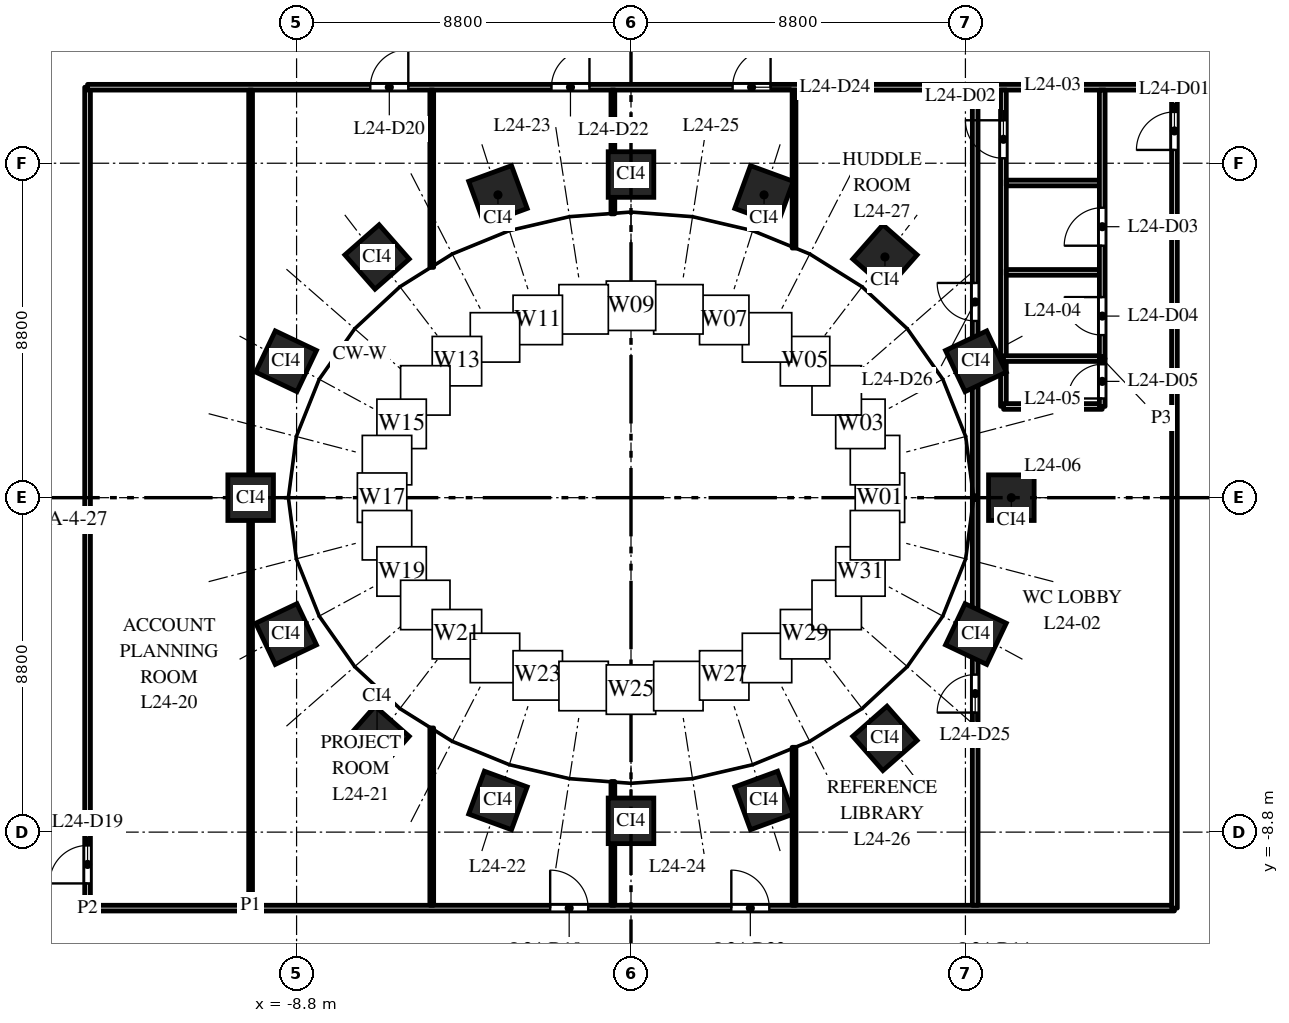
"""IFC4 building model, lengths in metres.
Left out: names, types, materials, properties, quantities, classifications, styles, units other than length and angle.
Written with IfcOpenShell. Run it as: python <this file> out.ifc"""

import sys

from ifc_helpers import new_model, si_unit, direction, frame, frame_2d, origin, origin_2d, place, context, subcontext, project, spatial, rectangle, extrude, element, fill, save


model = new_model("IFC4")
c1 = context("Model", 3, precision=1e-05, world=origin(), true_north=direction((0.0, 1.0)))
c2 = subcontext(c1, "Body", "Model", "MODEL_VIEW")
j1 = project(units=[si_unit("LENGTHUNIT", "METRE"), si_unit("PLANEANGLEUNIT", "RADIAN")], contexts=[c1])
p1 = place(None, origin())
s1 = spatial("IfcSite", under=j1, at=p1, CompositionType="ELEMENT")
p2 = place(p1, origin())
s2 = spatial("IfcBuilding", under=s1, at=p2, CompositionType="ELEMENT")
p3 = place(p2, frame((0.0, 0.0, 108.0)))
s3 = spatial("IfcBuildingStorey", under=s2, at=p3, CompositionType="ELEMENT", Elevation=108.0)
for number, where, z_axis, x_axis in (
    (1, (10.008, 0.0, 0.0), (0.0, 0.0, 1.0), (0.0, 1.0, 0.0)),
    (2, (9.076, 3.588, 0.0), (0.0, 0.0, 1.0), (-0.429, 0.903, 0.0)),
    (3, (6.682, 6.334, 0.0), (0.0, 0.0, 1.0), (-0.751, 0.66, 0.0)),
    (4, (3.501, 7.967, 0.0), (0.0, 0.0, 1.0), (-0.939, 0.344, 0.0)),
    (5, (0.0, 8.503, 0.0), (0.0, 0.0, 1.0), (-1.0, 0.0, 0.0)),
    (6, (-3.501, 7.967, 0.0), (0.0, 0.0, 1.0), (-0.939, -0.344, 0.0)),
    (7, (-6.682, 6.334, 0.0), (0.0, 0.0, 1.0), (-0.751, -0.66, 0.0)),
    (8, (-9.076, 3.588, 0.0), (0.0, 0.0, 1.0), (-0.429, -0.903, 0.0)),
    (9, (-10.008, 0.0, 0.0), (0.0, 0.0, 1.0), (0.0, -1.0, 0.0)),
    (10, (-9.076, -3.588, 0.0), (0.0, 0.0, 1.0), (0.429, -0.903, 0.0)),
    (11, (-6.682, -6.334, 0.0), (0.0, 0.0, 1.0), (0.751, -0.66, 0.0)),
    (12, (-3.501, -7.967, 0.0), (0.0, 0.0, 1.0), (0.939, -0.344, 0.0)),
    (13, (0.0, -8.503, 0.0), (0.0, 0.0, 1.0), (1.0, 0.0, 0.0)),
    (14, (3.501, -7.967, 0.0), (0.0, 0.0, 1.0), (0.939, 0.344, 0.0)),
    (15, (6.682, -6.334, 0.0), (0.0, 0.0, 1.0), (0.751, 0.66, 0.0)),
    (16, (9.076, -3.588, 0.0), (0.0, 0.0, 1.0), (0.429, 0.903, 0.0)),
):
    element("IfcColumn", number, at=place(p3, frame(where, z_axis=z_axis, x_axis=x_axis)), inside=s3, PredefinedType="COLUMN", context=c2, shape_type="SweptSolid", body=[
        extrude(rectangle(XDim=1.2, YDim=1.2, at=origin_2d()), origin(), (0.0, 0.0, 1.0), 4.0),
    ])
p4 = place(p3, frame((-14.3, -10.8, 0.0), z_axis=(0.0, 0.0, 1.0), x_axis=(0.0, 1.0, 0.0)))
e17 = element("IfcWall", 17, at=p4, inside=s3, PredefinedType="PARTITIONING", context=c2, shape_type="SweptSolid", body=[
    extrude(rectangle(XDim=21.6, YDim=0.15, at=frame_2d((10.8, 0.0))), origin(), (0.0, 0.0, 1.0), 2.75),
])
p5 = place(p4, frame((0.65, 0.0, 0.0)))
e18 = element("IfcOpeningElement", 18, at=p5, cuts=e17, PredefinedType="OPENING", context=c2, shape_type="SweptSolid", body=[
    extrude(rectangle(XDim=1.0, YDim=2.1, at=frame_2d((0.5, 1.05))), frame((0.0, 0.085, 0.0), z_axis=(0.0, -1.0, 0.0), x_axis=(1.0, 0.0, 0.0)), (0.0, 0.0, 1.0), 0.17),
])
p6 = place(p3, frame((-14.3, -10.8, 0.0), z_axis=(0.0, 0.0, 1.0), x_axis=(1.0, 0.0, 0.0)))
e19 = element("IfcWall", 19, at=p6, inside=s3, PredefinedType="PARTITIONING", context=c2, shape_type="SweptSolid", body=[
    extrude(rectangle(XDim=28.6, YDim=0.15, at=frame_2d((14.3, 0.0))), origin(), (0.0, 0.0, 1.0), 2.85),
])
p7 = place(p6, frame((12.173, 0.0, 0.0)))
e20 = element("IfcOpeningElement", 20, at=p7, cuts=e19, PredefinedType="OPENING", context=c2, shape_type="SweptSolid", body=[
    extrude(rectangle(XDim=1.0, YDim=2.1, at=frame_2d((0.5, 1.05))), frame((0.0, 0.085, 0.0), z_axis=(0.0, -1.0, 0.0), x_axis=(1.0, 0.0, 0.0)), (0.0, 0.0, 1.0), 0.17),
])
p8 = place(p6, frame((16.94, 0.0, 0.0)))
e21 = element("IfcOpeningElement", 21, at=p8, cuts=e19, PredefinedType="OPENING", context=c2, shape_type="SweptSolid", body=[
    extrude(rectangle(XDim=1.0, YDim=2.1, at=frame_2d((0.5, 1.05))), frame((0.0, 0.085, 0.0), z_axis=(0.0, -1.0, 0.0), x_axis=(1.0, 0.0, 0.0)), (0.0, 0.0, 1.0), 0.17),
])
p9 = place(p3, frame((-14.3, 10.8, 0.0), z_axis=(0.0, 0.0, 1.0), x_axis=(1.0, 0.0, 0.0)))
e22 = element("IfcWall", 22, at=p9, inside=s3, PredefinedType="PARTITIONING", context=c2, shape_type="SweptSolid", body=[
    extrude(rectangle(XDim=28.6, YDim=0.15, at=frame_2d((14.3, 0.0))), origin(), (0.0, 0.0, 1.0), 2.85),
])
p10 = place(p9, frame((7.44, 0.0, 0.0)))
e23 = element("IfcOpeningElement", 23, at=p10, cuts=e22, PredefinedType="OPENING", context=c2, shape_type="SweptSolid", body=[
    extrude(rectangle(XDim=1.0, YDim=2.1, at=frame_2d((0.5, 1.05))), frame((0.0, 0.085, 0.0), z_axis=(0.0, -1.0, 0.0), x_axis=(1.0, 0.0, 0.0)), (0.0, 0.0, 1.0), 0.17),
])
p11 = place(p9, frame((12.207, 0.0, 0.0)))
e24 = element("IfcOpeningElement", 24, at=p11, cuts=e22, PredefinedType="OPENING", context=c2, shape_type="SweptSolid", body=[
    extrude(rectangle(XDim=1.0, YDim=2.1, at=frame_2d((0.5, 1.05))), frame((0.0, 0.085, 0.0), z_axis=(0.0, -1.0, 0.0), x_axis=(1.0, 0.0, 0.0)), (0.0, 0.0, 1.0), 0.17),
])
p12 = place(p9, frame((16.973, 0.0, 0.0)))
e25 = element("IfcOpeningElement", 25, at=p12, cuts=e22, PredefinedType="OPENING", context=c2, shape_type="SweptSolid", body=[
    extrude(rectangle(XDim=1.0, YDim=2.1, at=frame_2d((0.5, 1.05))), frame((0.0, 0.085, 0.0), z_axis=(0.0, -1.0, 0.0), x_axis=(1.0, 0.0, 0.0)), (0.0, 0.0, 1.0), 0.17),
])
p13 = place(p3, frame((-10.01, -10.725, 0.0), z_axis=(0.0, 0.0, 1.0), x_axis=(0.0, 1.0, 0.0)))
e26 = element("IfcWall", 26, at=p13, inside=s3, PredefinedType="PARTITIONING", context=c2, shape_type="SweptSolid", body=[
    extrude(rectangle(XDim=21.45, YDim=0.1, at=frame_2d((10.725, 0.0))), origin(), (0.0, 0.0, 1.0), 2.75),
])
for number, where, z_axis, x_axis in (
    (27, (-5.243, -10.725, 0.0), (0.0, 0.0, 1.0), (0.0, 1.0, 0.0)),
    (28, (-5.243, 6.059, 0.0), (0.0, 0.0, 1.0), (0.0, 1.0, 0.0)),
):
    element("IfcWall", number, at=place(p3, frame(where, z_axis=z_axis, x_axis=x_axis)), inside=s3, PredefinedType="PARTITIONING", context=c2, shape_type="SweptSolid", body=[
        extrude(rectangle(XDim=4.666, YDim=0.1, at=frame_2d((2.333, 0.0))), origin(), (0.0, 0.0, 1.0), 2.9),
    ])
for number, where, z_axis, x_axis in (
    (29, (-0.477, -10.725, 0.0), (0.0, 0.0, 1.0), (0.0, 1.0, 0.0)),
    (30, (-0.477, 7.468, 0.0), (0.0, 0.0, 1.0), (0.0, 1.0, 0.0)),
):
    element("IfcWall", number, at=place(p3, frame(where, z_axis=z_axis, x_axis=x_axis)), inside=s3, PredefinedType="PARTITIONING", context=c2, shape_type="SweptSolid", body=[
        extrude(rectangle(XDim=3.257, YDim=0.1, at=frame_2d((1.628, 0.0))), origin(), (0.0, 0.0, 1.0), 2.9),
    ])
for number, where, z_axis, x_axis in (
    (31, (4.29, -10.725, 0.0), (0.0, 0.0, 1.0), (0.0, 1.0, 0.0)),
    (32, (4.29, 6.568, 0.0), (0.0, 0.0, 1.0), (0.0, 1.0, 0.0)),
):
    element("IfcWall", number, at=place(p3, frame(where, z_axis=z_axis, x_axis=x_axis)), inside=s3, PredefinedType="PARTITIONING", context=c2, shape_type="SweptSolid", body=[
        extrude(rectangle(XDim=4.157, YDim=0.1, at=frame_2d((2.079, 0.0))), origin(), (0.0, 0.0, 1.0), 2.9),
    ])
p14 = place(p3, frame((9.057, -10.725, 0.0), z_axis=(0.0, 0.0, 1.0), x_axis=(0.0, 1.0, 0.0)))
e33 = element("IfcWall", 33, at=p14, inside=s3, PredefinedType="PARTITIONING", context=c2, shape_type="SweptSolid", body=[
    extrude(rectangle(XDim=10.68, YDim=0.15, at=frame_2d((5.34, 0.0))), origin(), (0.0, 0.0, 1.0), 2.75),
])
p15 = place(p14, frame((5.07, 0.0, 0.0)))
e34 = element("IfcOpeningElement", 34, at=p15, cuts=e33, PredefinedType="OPENING", context=c2, shape_type="SweptSolid", body=[
    extrude(rectangle(XDim=1.0, YDim=2.1, at=frame_2d((0.5, 1.05))), frame((0.0, 0.085, 0.0), z_axis=(0.0, -1.0, 0.0), x_axis=(1.0, 0.0, 0.0)), (0.0, 0.0, 1.0), 0.17),
])
p16 = place(p3, frame((9.057, 0.045, 0.0), z_axis=(0.0, 0.0, 1.0), x_axis=(0.0, 1.0, 0.0)))
e35 = element("IfcWall", 35, at=p16, inside=s3, PredefinedType="PARTITIONING", context=c2, shape_type="SweptSolid", body=[
    extrude(rectangle(XDim=10.68, YDim=0.15, at=frame_2d((5.34, 0.0))), origin(), (0.0, 0.0, 1.0), 2.75),
])
p17 = place(p16, frame((4.605, 0.0, 0.0)))
e36 = element("IfcOpeningElement", 36, at=p17, cuts=e35, PredefinedType="OPENING", context=c2, shape_type="SweptSolid", body=[
    extrude(rectangle(XDim=1.0, YDim=2.1, at=frame_2d((0.5, 1.05))), frame((0.0, 0.085, 0.0), z_axis=(0.0, -1.0, 0.0), x_axis=(1.0, 0.0, 0.0)), (0.0, 0.0, 1.0), 0.17),
])
p18 = place(p3, frame((9.8, 2.404, 0.0), z_axis=(0.0, 0.0, 1.0), x_axis=(0.0, 1.0, 0.0)))
e37 = element("IfcWall", 37, at=p18, inside=s3, PredefinedType="PARTITIONING", context=c2, shape_type="SweptSolid", body=[
    extrude(rectangle(XDim=1.256, YDim=0.15, at=frame_2d((0.628, 0.0))), origin(), (0.0, 0.0, 1.0), 3.7),
])
p19 = place(p3, frame((9.8, 3.66, 0.0), z_axis=(0.0, 0.0, 1.0), x_axis=(0.0, 1.0, 0.0)))
e38 = element("IfcWall", 38, at=p19, inside=s3, PredefinedType="PARTITIONING", context=c2, shape_type="SweptSolid", body=[
    extrude(rectangle(XDim=7.065, YDim=0.15, at=frame_2d((3.533, 0.0))), origin(), (0.0, 0.0, 1.0), 2.75),
])
p20 = place(p19, frame((5.27, 0.0, 0.0)))
e39 = element("IfcOpeningElement", 39, at=p20, cuts=e38, PredefinedType="OPENING", context=c2, shape_type="SweptSolid", body=[
    extrude(rectangle(XDim=1.0, YDim=2.1, at=frame_2d((0.5, 1.05))), frame((0.0, 0.085, 0.0), z_axis=(0.0, -1.0, 0.0), x_axis=(1.0, 0.0, 0.0)), (0.0, 0.0, 1.0), 0.17),
])
p21 = place(p3, frame((9.8, 3.66, 0.0), z_axis=(0.0, 0.0, 1.0), x_axis=(1.0, 0.0, 0.0)))
e40 = element("IfcWall", 40, at=p21, inside=s3, PredefinedType="PARTITIONING", context=c2, shape_type="SweptSolid", body=[
    extrude(rectangle(XDim=2.6, YDim=0.15, at=frame_2d((1.3, 0.0))), origin(), (0.0, 0.0, 1.0), 3.7),
])
p22 = place(p3, frame((9.875, 5.928, 0.0), z_axis=(0.0, 0.0, 1.0), x_axis=(1.0, 0.0, 0.0)))
e41 = element("IfcWall", 41, at=p22, inside=s3, PredefinedType="PARTITIONING", context=c2, shape_type="SweptSolid", body=[
    extrude(rectangle(XDim=2.45, YDim=0.15, at=frame_2d((1.225, 0.0))), origin(), (0.0, 0.0, 1.0), 2.75),
])
p23 = place(p3, frame((9.875, 8.28, 0.0), z_axis=(0.0, 0.0, 1.0), x_axis=(1.0, 0.0, 0.0)))
e42 = element("IfcWall", 42, at=p23, inside=s3, PredefinedType="PARTITIONING", context=c2, shape_type="SweptSolid", body=[
    extrude(rectangle(XDim=2.45, YDim=0.15, at=frame_2d((1.225, 0.0))), origin(), (0.0, 0.0, 1.0), 3.7),
])
p24 = place(p3, frame((9.804, 2.4, 0.0), z_axis=(0.0, 0.0, 1.0), x_axis=(1.0, 0.0, 0.0)))
e43 = element("IfcWall", 43, at=p24, inside=s3, PredefinedType="PARTITIONING", context=c2, shape_type="SweptSolid", body=[
    extrude(rectangle(XDim=2.596, YDim=0.15, at=frame_2d((1.298, 0.0))), origin(), (0.0, 0.0, 1.0), 3.7),
])
p25 = place(p3, frame((12.4, 2.4, 0.0), z_axis=(0.0, 0.0, 1.0), x_axis=(0.0, 1.0, 0.0)))
e44 = element("IfcWall", 44, at=p25, inside=s3, PredefinedType="PARTITIONING", context=c2, shape_type="SweptSolid", body=[
    extrude(rectangle(XDim=1.26, YDim=0.15, at=frame_2d((0.63, 0.0))), origin(), (0.0, 0.0, 1.0), 3.7),
])
p26 = place(p25, frame((0.21, 0.0, 0.0)))
e45 = element("IfcOpeningElement", 45, at=p26, cuts=e44, PredefinedType="OPENING", context=c2, shape_type="SweptSolid", body=[
    extrude(rectangle(XDim=0.9, YDim=2.1, at=frame_2d((0.45, 1.05))), frame((0.0, 0.085, 0.0), z_axis=(0.0, -1.0, 0.0), x_axis=(1.0, 0.0, 0.0)), (0.0, 0.0, 1.0), 0.17),
])
p27 = place(p3, frame((12.4, 3.66, 0.0), z_axis=(0.0, 0.0, 1.0), x_axis=(0.0, 1.0, 0.0)))
e46 = element("IfcWall", 46, at=p27, inside=s3, PredefinedType="PARTITIONING", context=c2, shape_type="SweptSolid", body=[
    extrude(rectangle(XDim=7.065, YDim=0.15, at=frame_2d((3.533, 0.0))), origin(), (0.0, 0.0, 1.0), 2.75),
])
p28 = place(p27, frame((2.97, 0.0, 0.0)))
e47 = element("IfcOpeningElement", 47, at=p28, cuts=e46, PredefinedType="OPENING", context=c2, shape_type="SweptSolid", body=[
    extrude(rectangle(XDim=1.0, YDim=2.1, at=frame_2d((0.5, 1.05))), frame((0.0, 0.085, 0.0), z_axis=(0.0, -1.0, 0.0), x_axis=(1.0, 0.0, 0.0)), (0.0, 0.0, 1.0), 0.17),
])
p29 = place(p27, frame((0.618, 0.0, 0.0)))
e48 = element("IfcOpeningElement", 48, at=p29, cuts=e46, PredefinedType="OPENING", context=c2, shape_type="SweptSolid", body=[
    extrude(rectangle(XDim=1.0, YDim=2.1, at=frame_2d((0.5, 1.05))), frame((0.0, 0.085, 0.0), z_axis=(0.0, -1.0, 0.0), x_axis=(1.0, 0.0, 0.0)), (0.0, 0.0, 1.0), 0.17),
])
p30 = place(p3, frame((14.3, -10.8, 0.0), z_axis=(0.0, 0.0, 1.0), x_axis=(0.0, 1.0, 0.0)))
e49 = element("IfcWall", 49, at=p30, inside=s3, PredefinedType="PARTITIONING", context=c2, shape_type="SweptSolid", body=[
    extrude(rectangle(XDim=21.6, YDim=0.15, at=frame_2d((10.8, 0.0))), origin(), (0.0, 0.0, 1.0), 2.75),
])
p31 = place(p30, frame((19.95, 0.0, 0.0)))
e50 = element("IfcOpeningElement", 50, at=p31, cuts=e49, PredefinedType="OPENING", context=c2, shape_type="SweptSolid", body=[
    extrude(rectangle(XDim=1.0, YDim=2.1, at=frame_2d((0.5, 1.05))), frame((0.0, 0.085, 0.0), z_axis=(0.0, -1.0, 0.0), x_axis=(1.0, 0.0, 0.0)), (0.0, 0.0, 1.0), 0.17),
])
p32 = place(p31, origin())
e51 = element("IfcDoor", 51, at=p32, inside=s3, OperationType="SINGLE_SWING_LEFT", PredefinedType="DOOR", context=c2, shape_type="SweptSolid", body=[
    extrude(rectangle(XDim=1.0, YDim=2.1, at=frame_2d((0.5, 1.05))), frame((0.0, 0.025, 0.0), z_axis=(0.0, -1.0, 0.0), x_axis=(1.0, 0.0, 0.0)), (0.0, 0.0, 1.0), 0.05),
])
fill(e50, e51)
p33 = place(p20, origin())
e52 = element("IfcDoor", 52, at=p33, inside=s3, OperationType="SINGLE_SWING_RIGHT", PredefinedType="DOOR", context=c2, shape_type="SweptSolid", body=[
    extrude(rectangle(XDim=1.0, YDim=2.1, at=frame_2d((0.5, 1.05))), frame((0.0, 0.025, 0.0), z_axis=(0.0, -1.0, 0.0), x_axis=(1.0, 0.0, 0.0)), (0.0, 0.0, 1.0), 0.05),
])
fill(e39, e52)
p34 = place(p28, origin())
e53 = element("IfcDoor", 53, at=p34, inside=s3, OperationType="SINGLE_SWING_LEFT", PredefinedType="DOOR", context=c2, shape_type="SweptSolid", body=[
    extrude(rectangle(XDim=1.0, YDim=2.1, at=frame_2d((0.5, 1.05))), frame((0.0, 0.025, 0.0), z_axis=(0.0, -1.0, 0.0), x_axis=(1.0, 0.0, 0.0)), (0.0, 0.0, 1.0), 0.05),
])
fill(e47, e53)
p35 = place(p29, origin())
e54 = element("IfcDoor", 54, at=p35, inside=s3, OperationType="SINGLE_SWING_RIGHT", PredefinedType="DOOR", context=c2, shape_type="SweptSolid", body=[
    extrude(rectangle(XDim=1.0, YDim=2.1, at=frame_2d((0.5, 1.05))), frame((0.0, 0.025, 0.0), z_axis=(0.0, -1.0, 0.0), x_axis=(1.0, 0.0, 0.0)), (0.0, 0.0, 1.0), 0.05),
])
fill(e48, e54)
p36 = place(p26, origin())
e55 = element("IfcDoor", 55, at=p36, inside=s3, OperationType="SINGLE_SWING_LEFT", PredefinedType="DOOR", context=c2, shape_type="SweptSolid", body=[
    extrude(rectangle(XDim=0.9, YDim=2.1, at=frame_2d((0.45, 1.05))), frame((0.0, 0.025, 0.0), z_axis=(0.0, -1.0, 0.0), x_axis=(1.0, 0.0, 0.0)), (0.0, 0.0, 1.0), 0.05),
])
fill(e45, e55)
p37 = place(p5, origin())
e56 = element("IfcDoor", 56, at=p37, inside=s3, OperationType="SINGLE_SWING_LEFT", PredefinedType="DOOR", context=c2, shape_type="SweptSolid", body=[
    extrude(rectangle(XDim=1.0, YDim=2.1, at=frame_2d((0.5, 1.05))), frame((0.0, 0.025, 0.0), z_axis=(0.0, -1.0, 0.0), x_axis=(1.0, 0.0, 0.0)), (0.0, 0.0, 1.0), 0.05),
])
fill(e18, e56)
p38 = place(p10, origin())
e57 = element("IfcDoor", 57, at=p38, inside=s3, OperationType="SINGLE_SWING_RIGHT", PredefinedType="DOOR", context=c2, shape_type="SweptSolid", body=[
    extrude(rectangle(XDim=1.0, YDim=2.1, at=frame_2d((0.5, 1.05))), frame((0.0, 0.025, 0.0), z_axis=(0.0, -1.0, 0.0), x_axis=(1.0, 0.0, 0.0)), (0.0, 0.0, 1.0), 0.05),
])
fill(e23, e57)
p39 = place(p7, origin())
e58 = element("IfcDoor", 58, at=p39, inside=s3, OperationType="SINGLE_SWING_LEFT", PredefinedType="DOOR", context=c2, shape_type="SweptSolid", body=[
    extrude(rectangle(XDim=1.0, YDim=2.1, at=frame_2d((0.5, 1.05))), frame((0.0, 0.025, 0.0), z_axis=(0.0, -1.0, 0.0), x_axis=(1.0, 0.0, 0.0)), (0.0, 0.0, 1.0), 0.05),
])
fill(e20, e58)
p40 = place(p11, origin())
e59 = element("IfcDoor", 59, at=p40, inside=s3, OperationType="SINGLE_SWING_RIGHT", PredefinedType="DOOR", context=c2, shape_type="SweptSolid", body=[
    extrude(rectangle(XDim=1.0, YDim=2.1, at=frame_2d((0.5, 1.05))), frame((0.0, 0.025, 0.0), z_axis=(0.0, -1.0, 0.0), x_axis=(1.0, 0.0, 0.0)), (0.0, 0.0, 1.0), 0.05),
])
fill(e24, e59)
p41 = place(p8, origin())
e60 = element("IfcDoor", 60, at=p41, inside=s3, OperationType="SINGLE_SWING_LEFT", PredefinedType="DOOR", context=c2, shape_type="SweptSolid", body=[
    extrude(rectangle(XDim=1.0, YDim=2.1, at=frame_2d((0.5, 1.05))), frame((0.0, 0.025, 0.0), z_axis=(0.0, -1.0, 0.0), x_axis=(1.0, 0.0, 0.0)), (0.0, 0.0, 1.0), 0.05),
])
fill(e21, e60)
p42 = place(p12, origin())
e61 = element("IfcDoor", 61, at=p42, inside=s3, OperationType="SINGLE_SWING_RIGHT", PredefinedType="DOOR", context=c2, shape_type="SweptSolid", body=[
    extrude(rectangle(XDim=1.0, YDim=2.1, at=frame_2d((0.5, 1.05))), frame((0.0, 0.025, 0.0), z_axis=(0.0, -1.0, 0.0), x_axis=(1.0, 0.0, 0.0)), (0.0, 0.0, 1.0), 0.05),
])
fill(e25, e61)
p43 = place(p15, origin())
e62 = element("IfcDoor", 62, at=p43, inside=s3, OperationType="SINGLE_SWING_LEFT", PredefinedType="DOOR", context=c2, shape_type="SweptSolid", body=[
    extrude(rectangle(XDim=1.0, YDim=2.1, at=frame_2d((0.5, 1.05))), frame((0.0, 0.025, 0.0), z_axis=(0.0, -1.0, 0.0), x_axis=(1.0, 0.0, 0.0)), (0.0, 0.0, 1.0), 0.05),
])
fill(e34, e62)
p44 = place(p17, origin())
e63 = element("IfcDoor", 63, at=p44, inside=s3, OperationType="SINGLE_SWING_RIGHT", PredefinedType="DOOR", context=c2, shape_type="SweptSolid", body=[
    extrude(rectangle(XDim=1.0, YDim=2.1, at=frame_2d((0.5, 1.05))), frame((0.0, 0.025, 0.0), z_axis=(0.0, -1.0, 0.0), x_axis=(1.0, 0.0, 0.0)), (0.0, 0.0, 1.0), 0.05),
])
fill(e36, e63)
save(model, sys.argv[1])
